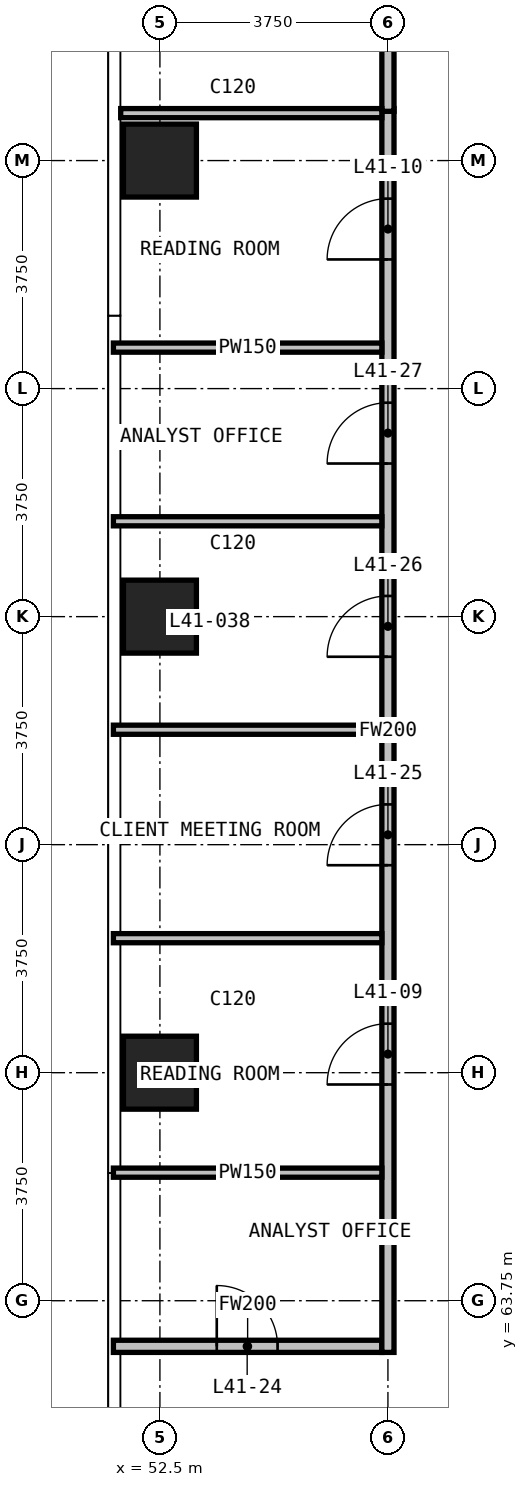
"""IFC4 building model, lengths in metres.
Left out: names, types, materials, properties, quantities, classifications, styles, units other than length and angle.
Written with IfcOpenShell. Run it as: python <this file> out.ifc"""

import sys

from ifc_helpers import new_model, si_unit, direction, frame, frame_2d, origin, origin_2d, place, context, subcontext, project, spatial, rectangle, extrude, element, fill, save


model = new_model("IFC4")
c1 = context("Model", 3, precision=1e-05, world=origin(), true_north=direction((0.0, 1.0)))
c2 = subcontext(c1, "Body", "Model", "MODEL_VIEW")
j1 = project(units=[si_unit("LENGTHUNIT", "METRE"), si_unit("PLANEANGLEUNIT", "RADIAN")], contexts=[c1])
p1 = place(None, origin())
s1 = spatial("IfcSite", under=j1, at=p1, CompositionType="ELEMENT")
p2 = place(p1, origin())
s2 = spatial("IfcBuilding", under=s1, at=p2, CompositionType="ELEMENT")
p3 = place(p2, frame((0.0, 0.0, 162.1)))
s3 = spatial("IfcBuildingStorey", under=s2, at=p3, CompositionType="ELEMENT", Elevation=162.1)
for number, where, z_axis, x_axis in (
    (1, (52.5, 67.5, 0.0), (0.0, 0.0, 1.0), (1.0, 0.0, 0.0)),
    (2, (52.5, 75.0, 0.0), (0.0, 0.0, 1.0), (1.0, 0.0, 0.0)),
    (3, (52.5, 82.5, 0.0), (0.0, 0.0, 1.0), (1.0, 0.0, 0.0)),
):
    element("IfcColumn", number, at=place(p3, frame(where, z_axis=z_axis, x_axis=x_axis)), inside=s3, PredefinedType="COLUMN", context=c2, shape_type="SweptSolid", body=[
        extrude(rectangle(XDim=1.2, YDim=1.2, at=origin_2d()), origin(), (0.0, 0.0, 1.0), 3.6),
    ])
p4 = place(p3, frame((51.735, 63.0, 0.0), z_axis=(0.0, 0.0, 1.0), x_axis=(1.0, 0.0, 0.0)))
e4 = element("IfcWall", 4, at=p4, inside=s3, PredefinedType="PARTITIONING", context=c2, shape_type="SweptSolid", body=[
    extrude(rectangle(XDim=4.415, YDim=0.2, at=frame_2d((2.208, 0.0))), origin(), (0.0, 0.0, 1.0), 3.3),
])
p5 = place(p4, frame((1.7, 0.0, 0.0)))
e5 = element("IfcOpeningElement", 5, at=p5, cuts=e4, PredefinedType="OPENING", context=c2, shape_type="SweptSolid", body=[
    extrude(rectangle(XDim=1.0, YDim=2.2, at=frame_2d((0.5, 1.1))), frame((0.0, 0.11, 0.0), z_axis=(0.0, -1.0, 0.0), x_axis=(1.0, 0.0, 0.0)), (0.0, 0.0, 1.0), 0.22),
])
p6 = place(p3, frame((56.25, 62.9, 0.0), z_axis=(0.0, 0.0, 1.0), x_axis=(0.0, 1.0, 0.0)))
e6 = element("IfcWall", 6, at=p6, inside=s3, PredefinedType="PARTITIONING", context=c2, shape_type="SweptSolid", body=[
    extrude(rectangle(XDim=20.455, YDim=0.2, at=frame_2d((10.228, 0.0))), origin(), (0.0, 0.0, 1.0), 3.3),
])
p7 = place(p6, frame((4.406, 0.0, 0.0)))
e7 = element("IfcOpeningElement", 7, at=p7, cuts=e6, PredefinedType="OPENING", context=c2, shape_type="SweptSolid", body=[
    extrude(rectangle(XDim=1.0, YDim=2.2, at=frame_2d((0.5, 1.1))), frame((0.0, 0.11, 0.0), z_axis=(0.0, -1.0, 0.0), x_axis=(1.0, 0.0, 0.0)), (0.0, 0.0, 1.0), 0.22),
])
p8 = place(p6, frame((17.974, 0.0, 0.0)))
e8 = element("IfcOpeningElement", 8, at=p8, cuts=e6, PredefinedType="OPENING", context=c2, shape_type="SweptSolid", body=[
    extrude(rectangle(XDim=1.0, YDim=2.2, at=frame_2d((0.5, 1.1))), frame((0.0, 0.11, 0.0), z_axis=(0.0, -1.0, 0.0), x_axis=(1.0, 0.0, 0.0)), (0.0, 0.0, 1.0), 0.22),
])
p9 = place(p6, frame((8.012, 0.0, 0.0)))
e9 = element("IfcOpeningElement", 9, at=p9, cuts=e6, PredefinedType="OPENING", context=c2, shape_type="SweptSolid", body=[
    extrude(rectangle(XDim=1.0, YDim=2.2, at=frame_2d((0.5, 1.1))), frame((0.0, 0.11, 0.0), z_axis=(0.0, -1.0, 0.0), x_axis=(1.0, 0.0, 0.0)), (0.0, 0.0, 1.0), 0.22),
])
p10 = place(p6, frame((11.44, 0.0, 0.0)))
e10 = element("IfcOpeningElement", 10, at=p10, cuts=e6, PredefinedType="OPENING", context=c2, shape_type="SweptSolid", body=[
    extrude(rectangle(XDim=1.0, YDim=2.2, at=frame_2d((0.5, 1.1))), frame((0.0, 0.11, 0.0), z_axis=(0.0, -1.0, 0.0), x_axis=(1.0, 0.0, 0.0)), (0.0, 0.0, 1.0), 0.22),
])
p11 = place(p6, frame((14.618, 0.0, 0.0)))
e11 = element("IfcOpeningElement", 11, at=p11, cuts=e6, PredefinedType="OPENING", context=c2, shape_type="SweptSolid", body=[
    extrude(rectangle(XDim=1.0, YDim=2.2, at=frame_2d((0.5, 1.1))), frame((0.0, 0.11, 0.0), z_axis=(0.0, -1.0, 0.0), x_axis=(1.0, 0.0, 0.0)), (0.0, 0.0, 1.0), 0.22),
])
p12 = place(p3, frame((56.25, 83.31, 0.0), z_axis=(0.0, 0.0, 1.0), x_axis=(0.0, 1.0, 0.0)))
e12 = element("IfcWall", 12, at=p12, inside=s3, PredefinedType="PARTITIONING", context=c2, shape_type="SweptSolid", body=[
    extrude(rectangle(XDim=7.335, YDim=0.2, at=frame_2d((3.667, 0.0))), origin(), (0.0, 0.0, 1.0), 3.3),
])
for number, where, z_axis, x_axis in (
    (13, (51.735, 65.856, 0.0), (0.0, 0.0, 1.0), (1.0, 0.0, 0.0)),
    (14, (51.735, 69.712, 0.0), (0.0, 0.0, 1.0), (1.0, 0.0, 0.0)),
    (15, (51.735, 73.14, 0.0), (0.0, 0.0, 1.0), (1.0, 0.0, 0.0)),
    (16, (51.735, 76.568, 0.0), (0.0, 0.0, 1.0), (1.0, 0.0, 0.0)),
    (17, (51.735, 79.424, 0.0), (0.0, 0.0, 1.0), (1.0, 0.0, 0.0)),
):
    element("IfcWall", number, at=place(p3, frame(where, z_axis=z_axis, x_axis=x_axis)), inside=s3, PredefinedType="PARTITIONING", context=c2, shape_type="SweptSolid", body=[
        extrude(rectangle(XDim=4.415, YDim=0.15, at=frame_2d((2.208, 0.0))), origin(), (0.0, 0.0, 1.0), 3.3),
    ])
p13 = place(p3, frame((51.855, 83.28, 0.0), z_axis=(0.0, 0.0, 1.0), x_axis=(1.0, 0.0, 0.0)))
e18 = element("IfcWall", 18, at=p13, inside=s3, PredefinedType="PARTITIONING", context=c2, shape_type="SweptSolid", body=[
    extrude(rectangle(XDim=4.295, YDim=0.15, at=frame_2d((2.147, 0.0))), origin(), (0.0, 0.0, 1.0), 3.3),
])
p14 = place(p7, origin())
e19 = element("IfcDoor", 19, at=p14, inside=s3, OperationType="SINGLE_SWING_RIGHT", PredefinedType="DOOR", context=c2, shape_type="SweptSolid", body=[
    extrude(rectangle(XDim=1.0, YDim=2.2, at=frame_2d((0.5, 1.1))), frame((0.0, 0.025, 0.0), z_axis=(0.0, -1.0, 0.0), x_axis=(1.0, 0.0, 0.0)), (0.0, 0.0, 1.0), 0.05),
])
fill(e7, e19)
p15 = place(p8, origin())
e20 = element("IfcDoor", 20, at=p15, inside=s3, OperationType="SINGLE_SWING_RIGHT", PredefinedType="DOOR", context=c2, shape_type="SweptSolid", body=[
    extrude(rectangle(XDim=1.0, YDim=2.2, at=frame_2d((0.5, 1.1))), frame((0.0, 0.025, 0.0), z_axis=(0.0, -1.0, 0.0), x_axis=(1.0, 0.0, 0.0)), (0.0, 0.0, 1.0), 0.05),
])
fill(e8, e20)
p16 = place(p5, origin())
e21 = element("IfcDoor", 21, at=p16, inside=s3, OperationType="SINGLE_SWING_RIGHT", PredefinedType="DOOR", context=c2, shape_type="SweptSolid", body=[
    extrude(rectangle(XDim=1.0, YDim=2.2, at=frame_2d((0.5, 1.1))), frame((0.0, 0.025, 0.0), z_axis=(0.0, -1.0, 0.0), x_axis=(1.0, 0.0, 0.0)), (0.0, 0.0, 1.0), 0.05),
])
fill(e5, e21)
p17 = place(p9, origin())
e22 = element("IfcDoor", 22, at=p17, inside=s3, OperationType="SINGLE_SWING_LEFT", PredefinedType="DOOR", context=c2, shape_type="SweptSolid", body=[
    extrude(rectangle(XDim=1.0, YDim=2.2, at=frame_2d((0.5, 1.1))), frame((0.0, 0.025, 0.0), z_axis=(0.0, -1.0, 0.0), x_axis=(1.0, 0.0, 0.0)), (0.0, 0.0, 1.0), 0.05),
])
fill(e9, e22)
p18 = place(p10, origin())
e23 = element("IfcDoor", 23, at=p18, inside=s3, OperationType="SINGLE_SWING_LEFT", PredefinedType="DOOR", context=c2, shape_type="SweptSolid", body=[
    extrude(rectangle(XDim=1.0, YDim=2.2, at=frame_2d((0.5, 1.1))), frame((0.0, 0.025, 0.0), z_axis=(0.0, -1.0, 0.0), x_axis=(1.0, 0.0, 0.0)), (0.0, 0.0, 1.0), 0.05),
])
fill(e10, e23)
p19 = place(p11, origin())
e24 = element("IfcDoor", 24, at=p19, inside=s3, OperationType="SINGLE_SWING_LEFT", PredefinedType="DOOR", context=c2, shape_type="SweptSolid", body=[
    extrude(rectangle(XDim=1.0, YDim=2.2, at=frame_2d((0.5, 1.1))), frame((0.0, 0.025, 0.0), z_axis=(0.0, -1.0, 0.0), x_axis=(1.0, 0.0, 0.0)), (0.0, 0.0, 1.0), 0.05),
])
fill(e11, e24)
save(model, sys.argv[1])
